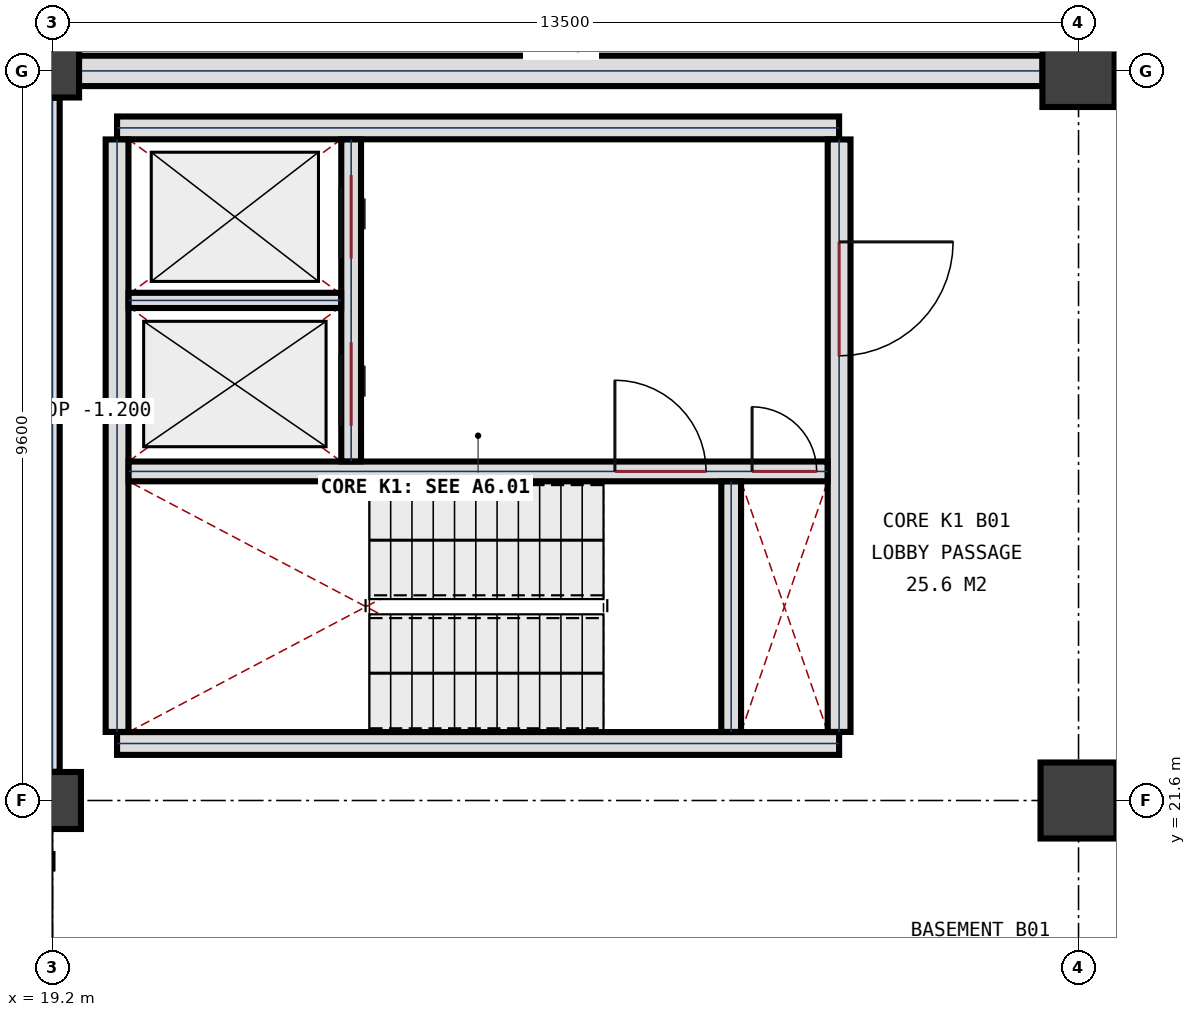
"""IFC4 building model, lengths in metres.
Left out: names, types, materials, properties, quantities, classifications, styles, units other than length and angle.
Written with IfcOpenShell. Run it as: python <this file> out.ifc"""

import sys

from ifc_helpers import new_model, si_unit, direction, frame, frame_2d, origin, origin_2d, place, context, subcontext, project, spatial, rectangle, extrude, element, fill, save


model = new_model("IFC4")
c1 = context("Model", 3, precision=1e-05, world=origin(), true_north=direction((0.0, 1.0)))
c2 = subcontext(c1, "Body", "Model", "MODEL_VIEW")
j1 = project(units=[si_unit("LENGTHUNIT", "METRE"), si_unit("PLANEANGLEUNIT", "RADIAN")], contexts=[c1])
p1 = place(None, origin())
s1 = spatial("IfcSite", under=j1, at=p1, CompositionType="ELEMENT")
p2 = place(p1, origin())
s2 = spatial("IfcBuilding", under=s1, at=p2, CompositionType="ELEMENT")
p3 = place(p2, frame((0.0, 0.0, -4.2)))
s3 = spatial("IfcBuildingStorey", under=s2, at=p3, CompositionType="ELEMENT", Elevation=-4.2)
p4 = place(p3, frame((19.2, 21.6, 0.0), z_axis=(0.0, 0.0, 1.0), x_axis=(1.0, 0.0, 0.0)))
e1 = element("IfcColumn", 1, at=p4, inside=s3, PredefinedType="COLUMN", context=c2, shape_type="SweptSolid", body=[
    extrude(rectangle(XDim=0.75, YDim=0.75, at=origin_2d()), origin(), (0.0, 0.0, 1.0), 4.2),
])
p5 = place(p3, frame((19.2, 31.2, 0.0), z_axis=(0.0, 0.0, 1.0), x_axis=(1.0, 0.0, 0.0)))
e2 = element("IfcColumn", 2, at=p5, inside=s3, PredefinedType="COLUMN", context=c2, shape_type="SweptSolid", body=[
    extrude(rectangle(XDim=0.7, YDim=0.7, at=origin_2d()), origin(), (0.0, 0.0, 1.0), 4.2),
])
p6 = place(p3, frame((32.7, 21.6, 0.0), z_axis=(0.0, 0.0, 1.0), x_axis=(1.0, 0.0, 0.0)))
e3 = element("IfcColumn", 3, at=p6, inside=s3, PredefinedType="COLUMN", context=c2, shape_type="SweptSolid", body=[
    extrude(rectangle(XDim=1.0, YDim=1.0, at=origin_2d()), origin(), (0.0, 0.0, 1.0), 4.2),
])
p7 = place(p3, frame((32.7, 31.2, 0.0), z_axis=(0.0, 0.0, 1.0), x_axis=(1.0, 0.0, 0.0)))
e4 = element("IfcColumn", 4, at=p7, inside=s3, PredefinedType="COLUMN", context=c2, shape_type="SweptSolid", body=[
    extrude(rectangle(XDim=0.95, YDim=0.95, at=origin_2d()), origin(), (0.0, 0.0, 1.0), 4.2),
])
p8 = place(p3, frame((19.548, 31.2, 0.0), z_axis=(0.0, 0.0, 1.0), x_axis=(1.0, 0.0, 0.0)))
e5 = element("IfcWall", 5, at=p8, inside=s3, PredefinedType="USERDEFINED", context=c2, shape_type="SweptSolid", body=[
    extrude(rectangle(XDim=12.679, YDim=0.4, at=frame_2d((6.339, 0.0))), origin(), (0.0, 0.0, 1.0), 3.86),
])
p9 = place(p3, frame((33.173, 31.2, 0.0), z_axis=(0.0, 0.0, 1.0), x_axis=(1.0, 0.0, 0.0)))
e6 = element("IfcWall", 6, at=p9, inside=s3, PredefinedType="USERDEFINED", context=c2, shape_type="SweptSolid", body=[
    extrude(rectangle(XDim=12.629, YDim=0.4, at=frame_2d((6.314, 0.0))), origin(), (0.0, 0.0, 1.0), 3.86),
])
for number, where, z_axis, x_axis in (
    (7, (29.55, 22.35, 0.0), (0.0, 0.0, 1.0), (-1.0, 0.0, 0.0)),
    (8, (20.05, 30.45, 0.0), (0.0, 0.0, 1.0), (1.0, 0.0, 0.0)),
):
    element("IfcWall", number, at=place(p3, frame(where, z_axis=z_axis, x_axis=x_axis)), inside=s3, PredefinedType="SHEAR", context=c2, shape_type="SweptSolid", body=[
        extrude(rectangle(XDim=9.5, YDim=0.3, at=frame_2d((4.75, 0.0))), origin(), (0.0, 0.0, 1.0), 4.2),
    ])
p10 = place(p3, frame((20.05, 22.502, 0.0), z_axis=(0.0, 0.0, 1.0), x_axis=(0.0, 1.0, 0.0)))
e9 = element("IfcWall", 9, at=p10, inside=s3, PredefinedType="SHEAR", context=c2, shape_type="SweptSolid", body=[
    extrude(rectangle(XDim=7.796, YDim=0.3, at=frame_2d((3.898, 0.0))), origin(), (0.0, 0.0, 1.0), 4.2),
])
p11 = place(p3, frame((29.55, 30.298, 0.0), z_axis=(0.0, 0.0, 1.0), x_axis=(0.0, -1.0, 0.0)))
e10 = element("IfcWall", 10, at=p11, inside=s3, PredefinedType="SHEAR", context=c2, shape_type="SweptSolid", body=[
    extrude(rectangle(XDim=7.796, YDim=0.3, at=frame_2d((3.898, 0.0))), origin(), (0.0, 0.0, 1.0), 4.2),
])
p12 = place(p11, frame((1.348, 0.0, 0.0)))
e11 = element("IfcOpeningElement", 11, at=p12, cuts=e10, PredefinedType="OPENING", context=c2, shape_type="SweptSolid", body=[
    extrude(rectangle(XDim=1.5, YDim=2.25, at=frame_2d((0.75, 1.125))), frame((0.0, 0.16, 0.0), z_axis=(0.0, -1.0, 0.0), x_axis=(1.0, 0.0, 0.0)), (0.0, 0.0, 1.0), 0.32),
])
p13 = place(p3, frame((20.202, 25.93, 0.0), z_axis=(0.0, 0.0, 1.0), x_axis=(1.0, 0.0, 0.0)))
e12 = element("IfcWall", 12, at=p13, inside=s3, PredefinedType="SHEAR", context=c2, shape_type="SweptSolid", body=[
    extrude(rectangle(XDim=9.196, YDim=0.26, at=frame_2d((4.598, 0.0))), origin(), (0.0, 0.0, 1.0), 4.2),
])
p14 = place(p13, frame((6.398, 0.0, 0.0)))
e13 = element("IfcOpeningElement", 13, at=p14, cuts=e12, PredefinedType="OPENING", context=c2, shape_type="SweptSolid", body=[
    extrude(rectangle(XDim=1.2, YDim=2.2, at=frame_2d((0.6, 1.1))), frame((0.0, 0.14, 0.0), z_axis=(0.0, -1.0, 0.0), x_axis=(1.0, 0.0, 0.0)), (0.0, 0.0, 1.0), 0.28),
])
p15 = place(p13, frame((8.203, 0.0, 0.0)))
e14 = element("IfcOpeningElement", 14, at=p15, cuts=e12, PredefinedType="OPENING", context=c2, shape_type="SweptSolid", body=[
    extrude(rectangle(XDim=0.85, YDim=2.05, at=frame_2d((0.425, 1.025))), frame((0.0, 0.14, 0.0), z_axis=(0.0, -1.0, 0.0), x_axis=(1.0, 0.0, 0.0)), (0.0, 0.0, 1.0), 0.28),
])
p16 = place(p3, frame((28.13, 22.502, 0.0), z_axis=(0.0, 0.0, 1.0), x_axis=(0.0, 1.0, 0.0)))
e15 = element("IfcWall", 15, at=p16, inside=s3, PredefinedType="SHEAR", context=c2, shape_type="SweptSolid", body=[
    extrude(rectangle(XDim=3.296, YDim=0.26, at=frame_2d((1.648, 0.0))), origin(), (0.0, 0.0, 1.0), 4.2),
])
p17 = place(p3, frame((23.13, 26.062, 0.0), z_axis=(0.0, 0.0, 1.0), x_axis=(0.0, 1.0, 0.0)))
e16 = element("IfcWall", 16, at=p17, inside=s3, PredefinedType="SHEAR", context=c2, shape_type="SweptSolid", body=[
    extrude(rectangle(XDim=4.236, YDim=0.26, at=frame_2d((2.118, 0.0))), origin(), (0.0, 0.0, 1.0), 4.2),
])
p18 = place(p17, frame((0.468, 0.0, 0.0)))
e17 = element("IfcOpeningElement", 17, at=p18, cuts=e16, PredefinedType="OPENING", context=c2, shape_type="SweptSolid", body=[
    extrude(rectangle(XDim=1.1, YDim=2.15, at=frame_2d((0.55, 1.075))), frame((0.0, 0.14, 0.0), z_axis=(0.0, -1.0, 0.0), x_axis=(1.0, 0.0, 0.0)), (0.0, 0.0, 1.0), 0.28),
])
p19 = place(p17, frame((2.668, 0.0, 0.0)))
e18 = element("IfcOpeningElement", 18, at=p19, cuts=e16, PredefinedType="OPENING", context=c2, shape_type="SweptSolid", body=[
    extrude(rectangle(XDim=1.1, YDim=2.15, at=frame_2d((0.55, 1.075))), frame((0.0, 0.14, 0.0), z_axis=(0.0, -1.0, 0.0), x_axis=(1.0, 0.0, 0.0)), (0.0, 0.0, 1.0), 0.28),
])
p20 = place(p3, frame((20.202, 28.18, 0.0), z_axis=(0.0, 0.0, 1.0), x_axis=(1.0, 0.0, 0.0)))
e19 = element("IfcWall", 19, at=p20, inside=s3, PredefinedType="PLUMBINGWALL", context=c2, shape_type="SweptSolid", body=[
    extrude(rectangle(XDim=2.796, YDim=0.2, at=frame_2d((1.398, 0.0))), origin(), (0.0, 0.0, 1.0), 3.86),
])
p21 = place(p3, frame((19.2, 21.978, 0.0), z_axis=(0.0, 0.0, 1.0), x_axis=(0.0, 1.0, 0.0)))
e20 = element("IfcWall", 20, at=p21, inside=s3, PredefinedType="PARTITIONING", context=c2, shape_type="SweptSolid", body=[
    extrude(rectangle(XDim=8.869, YDim=0.19, at=frame_2d((4.435, 0.0))), origin(), (0.0, 0.0, 1.0), 3.0),
])
p22 = place(p12, origin())
e21 = element("IfcDoor", 21, at=p22, inside=s3, OperationType="SINGLE_SWING_LEFT", PredefinedType="DOOR", context=c2, shape_type="SweptSolid", body=[
    extrude(rectangle(XDim=1.5, YDim=2.25, at=frame_2d((0.75, 1.125))), frame((0.0, 0.032, 0.0), z_axis=(0.0, -1.0, 0.0), x_axis=(1.0, 0.0, 0.0)), (0.0, 0.0, 1.0), 0.065),
])
fill(e11, e21)
p23 = place(p14, origin())
e22 = element("IfcDoor", 22, at=p23, inside=s3, OperationType="SINGLE_SWING_LEFT", PredefinedType="DOOR", context=c2, shape_type="SweptSolid", body=[
    extrude(rectangle(XDim=1.2, YDim=2.2, at=frame_2d((0.6, 1.1))), frame((0.0, 0.032, 0.0), z_axis=(0.0, -1.0, 0.0), x_axis=(1.0, 0.0, 0.0)), (0.0, 0.0, 1.0), 0.065),
])
fill(e13, e22)
p24 = place(p15, origin())
e23 = element("IfcDoor", 23, at=p24, inside=s3, OperationType="SINGLE_SWING_LEFT", PredefinedType="DOOR", context=c2, shape_type="SweptSolid", body=[
    extrude(rectangle(XDim=0.85, YDim=2.05, at=frame_2d((0.425, 1.025))), frame((0.0, 0.032, 0.0), z_axis=(0.0, -1.0, 0.0), x_axis=(1.0, 0.0, 0.0)), (0.0, 0.0, 1.0), 0.065),
])
fill(e14, e23)
p25 = place(p18, origin())
e24 = element("IfcDoor", 24, at=p25, inside=s3, OperationType="SLIDING_TO_LEFT", PredefinedType="DOOR", context=c2, shape_type="SweptSolid", body=[
    extrude(rectangle(XDim=1.1, YDim=2.15, at=frame_2d((0.55, 1.075))), frame((0.0, 0.032, 0.0), z_axis=(0.0, -1.0, 0.0), x_axis=(1.0, 0.0, 0.0)), (0.0, 0.0, 1.0), 0.065),
])
fill(e17, e24)
p26 = place(p19, origin())
e25 = element("IfcDoor", 25, at=p26, inside=s3, OperationType="SLIDING_TO_LEFT", PredefinedType="DOOR", context=c2, shape_type="SweptSolid", body=[
    extrude(rectangle(XDim=1.1, YDim=2.15, at=frame_2d((0.55, 1.075))), frame((0.0, 0.032, 0.0), z_axis=(0.0, -1.0, 0.0), x_axis=(1.0, 0.0, 0.0)), (0.0, 0.0, 1.0), 0.065),
])
fill(e18, e25)
save(model, sys.argv[1])
